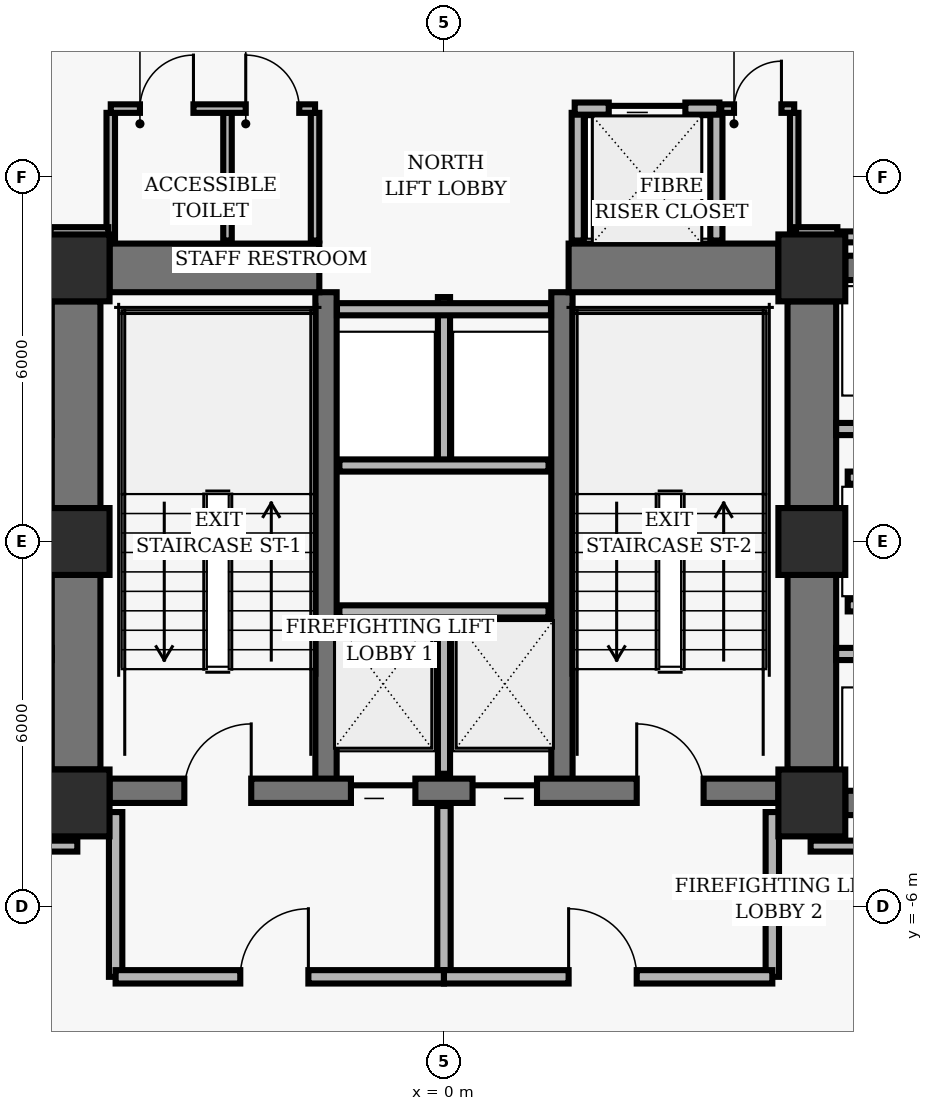
"""IFC4 building model, lengths in metres.
Left out: names, types, materials, properties, quantities, classifications, styles, units other than length and angle.
Written with IfcOpenShell. Run it as: python <this file> out.ifc"""

import sys

from ifc_helpers import new_model, si_unit, direction, frame, frame_2d, origin, origin_2d, place, context, subcontext, project, spatial, rectangle, hollow_rectangle, extrude, element, fill, save


model = new_model("IFC4")
c1 = context("Model", 3, precision=1e-05, world=origin(), true_north=direction((0.0, 1.0)))
c2 = subcontext(c1, "Body", "Model", "MODEL_VIEW")
j1 = project(units=[si_unit("LENGTHUNIT", "METRE"), si_unit("PLANEANGLEUNIT", "RADIAN")], contexts=[c1])
p1 = place(None, origin())
s1 = spatial("IfcSite", under=j1, at=p1, CompositionType="ELEMENT")
p2 = place(p1, origin())
s2 = spatial("IfcBuilding", under=s1, at=p2, CompositionType="ELEMENT")
p3 = place(p2, frame((0.0, 0.0, 15.36)))
s3 = spatial("IfcBuildingStorey", under=s2, at=p3, CompositionType="ELEMENT", Elevation=15.36)
for number, where, z_axis, x_axis in (
    (1, (-6.05, 4.5, 0.0), (0.0, 0.0, 1.0), (1.0, 0.0, 0.0)),
    (2, (6.05, 4.5, 0.0), (0.0, 0.0, 1.0), (1.0, 0.0, 0.0)),
    (3, (-6.05, 0.0, 0.0), (0.0, 0.0, 1.0), (1.0, 0.0, 0.0)),
    (4, (6.05, 0.0, 0.0), (0.0, 0.0, 1.0), (1.0, 0.0, 0.0)),
    (5, (-6.05, -4.3, 0.0), (0.0, 0.0, 1.0), (1.0, 0.0, 0.0)),
    (6, (6.05, -4.3, 0.0), (0.0, 0.0, 1.0), (1.0, 0.0, 0.0)),
):
    element("IfcColumn", number, at=place(p3, frame(where, z_axis=z_axis, x_axis=x_axis)), inside=s3, PredefinedType="COLUMN", context=c2, shape_type="SweptSolid", body=[
        extrude(hollow_rectangle(XDim=1.1, YDim=1.1, WallThickness=0.07, InnerFilletRadius=0.02, OuterFilletRadius=0.04, at=origin_2d()), origin(), (0.0, 0.0, 1.0), 3.52),
    ])
p4 = place(p3, frame((-6.05, 0.55, 0.0), z_axis=(0.0, 0.0, 1.0), x_axis=(0.0, 1.0, 0.0)))
e7 = element("IfcWall", 7, at=p4, inside=s3, PredefinedType="SHEAR", context=c2, shape_type="SweptSolid", body=[
    extrude(rectangle(XDim=3.4, YDim=0.8, at=frame_2d((1.7, 0.0))), origin(), (0.0, 0.0, 1.0), 3.098),
])
p5 = place(p3, frame((-6.05, -3.75, 0.0), z_axis=(0.0, 0.0, 1.0), x_axis=(0.0, 1.0, 0.0)))
e8 = element("IfcWall", 8, at=p5, inside=s3, PredefinedType="SHEAR", context=c2, shape_type="SweptSolid", body=[
    extrude(rectangle(XDim=3.2, YDim=0.8, at=frame_2d((1.6, 0.0))), origin(), (0.0, 0.0, 1.0), 3.098),
])
p6 = place(p3, frame((6.05, 0.55, 0.0), z_axis=(0.0, 0.0, 1.0), x_axis=(0.0, 1.0, 0.0)))
e9 = element("IfcWall", 9, at=p6, inside=s3, PredefinedType="SHEAR", context=c2, shape_type="SweptSolid", body=[
    extrude(rectangle(XDim=3.4, YDim=0.8, at=frame_2d((1.7, 0.0))), origin(), (0.0, 0.0, 1.0), 3.098),
])
p7 = place(p3, frame((6.05, -3.75, 0.0), z_axis=(0.0, 0.0, 1.0), x_axis=(0.0, 1.0, 0.0)))
e10 = element("IfcWall", 10, at=p7, inside=s3, PredefinedType="SHEAR", context=c2, shape_type="SweptSolid", body=[
    extrude(rectangle(XDim=3.2, YDim=0.8, at=frame_2d((1.6, 0.0))), origin(), (0.0, 0.0, 1.0), 3.098),
])
for number, where, z_axis, x_axis in (
    (11, (-1.94, -4.1, 0.0), (0.0, 0.0, 1.0), (0.0, 1.0, 0.0)),
    (12, (1.94, -4.1, 0.0), (0.0, 0.0, 1.0), (0.0, 1.0, 0.0)),
):
    element("IfcWall", number, at=place(p3, frame(where, z_axis=z_axis, x_axis=x_axis)), inside=s3, PredefinedType="SHEAR", context=c2, shape_type="SweptSolid", body=[
        extrude(rectangle(XDim=8.2, YDim=0.35, at=frame_2d((4.1, 0.0))), origin(), (0.0, 0.0, 1.0), 3.098),
    ])
p8 = place(p3, frame((-5.5, -4.1, 0.0), z_axis=(0.0, 0.0, 1.0), x_axis=(1.0, 0.0, 0.0)))
e13 = element("IfcWall", 13, at=p8, inside=s3, PredefinedType="SHEAR", context=c2, shape_type="SweptSolid", body=[
    extrude(rectangle(XDim=11.0, YDim=0.4, at=frame_2d((5.5, 0.0))), origin(), (0.0, 0.0, 1.0), 3.098),
])
p9 = place(p8, frame((1.23, 0.0, 0.0)))
e14 = element("IfcOpeningElement", 14, at=p9, cuts=e13, PredefinedType="OPENING", context=c2, shape_type="SweptSolid", body=[
    extrude(rectangle(XDim=1.1, YDim=2.04, at=frame_2d((0.55, 1.02))), frame((0.0, 0.21, 0.0), z_axis=(0.0, -1.0, 0.0), x_axis=(1.0, 0.0, 0.0)), (0.0, 0.0, 1.0), 0.42),
])
p10 = place(p8, frame((8.67, 0.0, 0.0)))
e15 = element("IfcOpeningElement", 15, at=p10, cuts=e13, PredefinedType="OPENING", context=c2, shape_type="SweptSolid", body=[
    extrude(rectangle(XDim=1.1, YDim=2.04, at=frame_2d((0.55, 1.02))), frame((0.0, 0.21, 0.0), z_axis=(0.0, -1.0, 0.0), x_axis=(1.0, 0.0, 0.0)), (0.0, 0.0, 1.0), 0.42),
])
p11 = place(p8, frame((3.97, 0.0, 0.0)))
e16 = element("IfcOpeningElement", 16, at=p11, cuts=e13, PredefinedType="OPENING", context=c2, shape_type="SweptSolid", body=[
    extrude(rectangle(XDim=1.06, YDim=2.04, at=frame_2d((0.53, 1.02))), frame((0.0, 0.21, 0.0), z_axis=(0.0, -1.0, 0.0), x_axis=(1.0, 0.0, 0.0)), (0.0, 0.0, 1.0), 0.42),
])
p12 = place(p8, frame((5.97, 0.0, 0.0)))
e17 = element("IfcOpeningElement", 17, at=p12, cuts=e13, PredefinedType="OPENING", context=c2, shape_type="SweptSolid", body=[
    extrude(rectangle(XDim=1.06, YDim=2.04, at=frame_2d((0.53, 1.02))), frame((0.0, 0.21, 0.0), z_axis=(0.0, -1.0, 0.0), x_axis=(1.0, 0.0, 0.0)), (0.0, 0.0, 1.0), 0.42),
])
for number, where, z_axis, x_axis in (
    (18, (-5.5, 4.5, 0.0), (0.0, 0.0, 1.0), (1.0, 0.0, 0.0)),
    (19, (2.05, 4.5, 0.0), (0.0, 0.0, 1.0), (1.0, 0.0, 0.0)),
):
    element("IfcWall", number, at=place(p3, frame(where, z_axis=z_axis, x_axis=x_axis)), inside=s3, PredefinedType="SHEAR", context=c2, shape_type="SweptSolid", body=[
        extrude(rectangle(XDim=3.45, YDim=0.8, at=frame_2d((1.725, 0.0))), origin(), (0.0, 0.0, 1.0), 3.098),
    ])
for number, where, z_axis, x_axis in (
    (20, (6.6, 4.5, 0.0), (0.0, 0.0, 1.0), (1.0, 0.0, 0.0)),
    (21, (6.6, -4.3, 0.0), (0.0, 0.0, 1.0), (1.0, 0.0, 0.0)),
):
    element("IfcWall", number, at=place(p3, frame(where, z_axis=z_axis, x_axis=x_axis)), inside=s3, PredefinedType="SHEAR", context=c2, shape_type="SweptSolid", body=[
        extrude(rectangle(XDim=1.8, YDim=0.4, at=frame_2d((0.9, 0.0))), origin(), (0.0, 0.0, 1.0), 3.098),
    ])
p13 = place(p3, frame((0.0, -3.82, 0.0), z_axis=(0.0, 0.0, 1.0), x_axis=(0.0, 1.0, 0.0)))
e22 = element("IfcWall", 22, at=p13, inside=s3, PredefinedType="PARTITIONING", context=c2, shape_type="SweptSolid", body=[
    extrude(rectangle(XDim=2.67, YDim=0.2, at=frame_2d((1.335, 0.0))), origin(), (0.0, 0.0, 1.0), 3.073),
])
p14 = place(p3, frame((-1.72, -1.15, 0.0), z_axis=(0.0, 0.0, 1.0), x_axis=(1.0, 0.0, 0.0)))
e23 = element("IfcWall", 23, at=p14, inside=s3, PredefinedType="PARTITIONING", context=c2, shape_type="SweptSolid", body=[
    extrude(rectangle(XDim=3.44, YDim=0.2, at=frame_2d((1.72, 0.0))), origin(), (0.0, 0.0, 1.0), 3.073),
])
for number, where, z_axis, x_axis in (
    (24, (-5.4, -7.16, 0.0), (0.0, 0.0, 1.0), (0.0, 1.0, 0.0)),
    (25, (5.4, -7.16, 0.0), (0.0, 0.0, 1.0), (0.0, 1.0, 0.0)),
):
    element("IfcWall", number, at=place(p3, frame(where, z_axis=z_axis, x_axis=x_axis)), inside=s3, PredefinedType="PARTITIONING", context=c2, shape_type="SweptSolid", body=[
        extrude(rectangle(XDim=2.71, YDim=0.22, at=frame_2d((1.355, 0.0))), origin(), (0.0, 0.0, 1.0), 3.073),
    ])
p15 = place(p3, frame((0.0, -7.16, 0.0), z_axis=(0.0, 0.0, 1.0), x_axis=(0.0, 1.0, 0.0)))
e26 = element("IfcWall", 26, at=p15, inside=s3, PredefinedType="PARTITIONING", context=c2, shape_type="SweptSolid", body=[
    extrude(rectangle(XDim=2.81, YDim=0.22, at=frame_2d((1.405, 0.0))), origin(), (0.0, 0.0, 1.0), 3.073),
])
p16 = place(p3, frame((-5.4, -7.16, 0.0), z_axis=(0.0, 0.0, 1.0), x_axis=(1.0, 0.0, 0.0)))
e27 = element("IfcWall", 27, at=p16, inside=s3, PredefinedType="PARTITIONING", context=c2, shape_type="SweptSolid", body=[
    extrude(rectangle(XDim=5.4, YDim=0.22, at=frame_2d((2.7, 0.0))), origin(), (0.0, 0.0, 1.0), 3.073),
])
p17 = place(p16, frame((2.05, 0.0, 0.0)))
e28 = element("IfcOpeningElement", 28, at=p17, cuts=e27, PredefinedType="OPENING", context=c2, shape_type="SweptSolid", body=[
    extrude(rectangle(XDim=1.12, YDim=2.02, at=frame_2d((0.56, 1.01))), frame((0.0, 0.12, 0.0), z_axis=(0.0, -1.0, 0.0), x_axis=(1.0, 0.0, 0.0)), (0.0, 0.0, 1.0), 0.24),
])
p18 = place(p3, frame((0.0, -7.16, 0.0), z_axis=(0.0, 0.0, 1.0), x_axis=(1.0, 0.0, 0.0)))
e29 = element("IfcWall", 29, at=p18, inside=s3, PredefinedType="PARTITIONING", context=c2, shape_type="SweptSolid", body=[
    extrude(rectangle(XDim=5.4, YDim=0.22, at=frame_2d((2.7, 0.0))), origin(), (0.0, 0.0, 1.0), 3.073),
])
p19 = place(p18, frame((2.05, 0.0, 0.0)))
e30 = element("IfcOpeningElement", 30, at=p19, cuts=e29, PredefinedType="OPENING", context=c2, shape_type="SweptSolid", body=[
    extrude(rectangle(XDim=1.12, YDim=2.02, at=frame_2d((0.56, 1.01))), frame((0.0, 0.12, 0.0), z_axis=(0.0, -1.0, 0.0), x_axis=(1.0, 0.0, 0.0)), (0.0, 0.0, 1.0), 0.24),
])
p20 = place(p3, frame((0.0, 1.25, 0.0), z_axis=(0.0, 0.0, 1.0), x_axis=(0.0, 1.0, 0.0)))
e31 = element("IfcWall", 31, at=p20, inside=s3, PredefinedType="PARTITIONING", context=c2, shape_type="SweptSolid", body=[
    extrude(rectangle(XDim=2.77, YDim=0.2, at=frame_2d((1.385, 0.0))), origin(), (0.0, 0.0, 1.0), 3.073),
])
p21 = place(p3, frame((-1.72, 1.25, 0.0), z_axis=(0.0, 0.0, 1.0), x_axis=(1.0, 0.0, 0.0)))
e32 = element("IfcWall", 32, at=p21, inside=s3, PredefinedType="PARTITIONING", context=c2, shape_type="SweptSolid", body=[
    extrude(rectangle(XDim=3.44, YDim=0.2, at=frame_2d((1.72, 0.0))), origin(), (0.0, 0.0, 1.0), 3.073),
])
p22 = place(p3, frame((-1.76, 3.82, 0.0), z_axis=(0.0, 0.0, 1.0), x_axis=(1.0, 0.0, 0.0)))
e33 = element("IfcWall", 33, at=p22, inside=s3, PredefinedType="PARTITIONING", context=c2, shape_type="SweptSolid", body=[
    extrude(rectangle(XDim=3.52, YDim=0.2, at=frame_2d((1.76, 0.0))), origin(), (0.0, 0.0, 1.0), 3.073),
])
for number, where, z_axis, x_axis in (
    (34, (2.2, 4.95, 0.0), (0.0, 0.0, 1.0), (0.0, 1.0, 0.0)),
    (35, (4.48, 4.95, 0.0), (0.0, 0.0, 1.0), (0.0, 1.0, 0.0)),
):
    element("IfcWall", number, at=place(p3, frame(where, z_axis=z_axis, x_axis=x_axis)), inside=s3, PredefinedType="PARTITIONING", context=c2, shape_type="SweptSolid", body=[
        extrude(rectangle(XDim=2.1, YDim=0.2, at=frame_2d((1.05, 0.0))), origin(), (0.0, 0.0, 1.0), 3.073),
    ])
p23 = place(p3, frame((2.15, 7.12, 0.0), z_axis=(0.0, 0.0, 1.0), x_axis=(1.0, 0.0, 0.0)))
e36 = element("IfcWall", 36, at=p23, inside=s3, PredefinedType="PARTITIONING", context=c2, shape_type="SweptSolid", body=[
    extrude(rectangle(XDim=2.38, YDim=0.2, at=frame_2d((1.19, 0.0))), origin(), (0.0, 0.0, 1.0), 2.587),
])
p24 = place(p23, frame((0.56, 0.0, 0.0)))
e37 = element("IfcOpeningElement", 37, at=p24, cuts=e36, PredefinedType="OPENING", context=c2, shape_type="SweptSolid", body=[
    extrude(rectangle(XDim=1.26, YDim=2.06, at=frame_2d((0.63, 1.03))), frame((0.0, 0.11, 0.0), z_axis=(0.0, -1.0, 0.0), x_axis=(1.0, 0.0, 0.0)), (0.0, 0.0, 1.0), 0.22),
])
for number, where, z_axis, x_axis in (
    (38, (-5.48, 4.95, 0.0), (0.0, 0.0, 1.0), (0.0, 1.0, 0.0)),
    (39, (-3.56, 4.95, 0.0), (0.0, 0.0, 1.0), (0.0, 1.0, 0.0)),
    (40, (-2.12, 4.95, 0.0), (0.0, 0.0, 1.0), (0.0, 1.0, 0.0)),
):
    element("IfcWall", number, at=place(p3, frame(where, z_axis=z_axis, x_axis=x_axis)), inside=s3, PredefinedType="PARTITIONING", context=c2, shape_type="SweptSolid", body=[
        extrude(rectangle(XDim=2.1, YDim=0.14, at=frame_2d((1.05, 0.0))), origin(), (0.0, 0.0, 1.0), 3.073),
    ])
p25 = place(p3, frame((-5.48, 7.12, 0.0), z_axis=(0.0, 0.0, 1.0), x_axis=(1.0, 0.0, 0.0)))
e41 = element("IfcWall", 41, at=p25, inside=s3, PredefinedType="PARTITIONING", context=c2, shape_type="SweptSolid", body=[
    extrude(rectangle(XDim=3.36, YDim=0.14, at=frame_2d((1.68, 0.0))), origin(), (0.0, 0.0, 1.0), 3.073),
])
p26 = place(p25, frame((0.48, 0.0, 0.0)))
e42 = element("IfcOpeningElement", 42, at=p26, cuts=e41, PredefinedType="OPENING", context=c2, shape_type="SweptSolid", body=[
    extrude(rectangle(XDim=0.88, YDim=2.02, at=frame_2d((0.44, 1.01))), frame((0.0, 0.08, 0.0), z_axis=(0.0, -1.0, 0.0), x_axis=(1.0, 0.0, 0.0)), (0.0, 0.0, 1.0), 0.16),
])
p27 = place(p25, frame((2.22, 0.0, 0.0)))
e43 = element("IfcOpeningElement", 43, at=p27, cuts=e41, PredefinedType="OPENING", context=c2, shape_type="SweptSolid", body=[
    extrude(rectangle(XDim=0.88, YDim=2.02, at=frame_2d((0.44, 1.01))), frame((0.0, 0.08, 0.0), z_axis=(0.0, -1.0, 0.0), x_axis=(1.0, 0.0, 0.0)), (0.0, 0.0, 1.0), 0.16),
])
p28 = place(p3, frame((5.76, 4.95, 0.0), z_axis=(0.0, 0.0, 1.0), x_axis=(0.0, 1.0, 0.0)))
e44 = element("IfcWall", 44, at=p28, inside=s3, PredefinedType="PARTITIONING", context=c2, shape_type="SweptSolid", body=[
    extrude(rectangle(XDim=2.1, YDim=0.14, at=frame_2d((1.05, 0.0))), origin(), (0.0, 0.0, 1.0), 2.198),
])
p29 = place(p3, frame((4.56, 7.12, 0.0), z_axis=(0.0, 0.0, 1.0), x_axis=(1.0, 0.0, 0.0)))
e45 = element("IfcWall", 45, at=p29, inside=s3, PredefinedType="PARTITIONING", context=c2, shape_type="SweptSolid", body=[
    extrude(rectangle(XDim=1.2, YDim=0.14, at=frame_2d((0.6, 0.0))), origin(), (0.0, 0.0, 1.0), 2.587),
])
p30 = place(p29, frame((0.21, 0.0, 0.0)))
e46 = element("IfcOpeningElement", 46, at=p30, cuts=e45, PredefinedType="OPENING", context=c2, shape_type="SweptSolid", body=[
    extrude(rectangle(XDim=0.78, YDim=2.01, at=frame_2d((0.39, 1.005))), frame((0.0, 0.08, 0.0), z_axis=(0.0, -1.0, 0.0), x_axis=(1.0, 0.0, 0.0)), (0.0, 0.0, 1.0), 0.16),
])
for number, where, z_axis, x_axis in (
    (47, (6.45, -1.85, 0.0), (0.0, 0.0, 1.0), (1.0, 0.0, 0.0)),
    (48, (6.45, 1.85, 0.0), (0.0, 0.0, 1.0), (1.0, 0.0, 0.0)),
):
    element("IfcWall", number, at=place(p3, frame(where, z_axis=z_axis, x_axis=x_axis)), inside=s3, PredefinedType="PARTITIONING", context=c2, shape_type="SweptSolid", body=[
        extrude(rectangle(XDim=2.1, YDim=0.2, at=frame_2d((1.05, 0.0))), origin(), (0.0, 0.0, 1.0), 3.073),
    ])
for number, where, z_axis, x_axis in (
    (49, (6.64, -1.05, 0.0), (0.0, 0.0, 1.0), (1.0, 0.0, 0.0)),
    (50, (6.64, 1.05, 0.0), (0.0, 0.0, 1.0), (1.0, 0.0, 0.0)),
):
    element("IfcWall", number, at=place(p3, frame(where, z_axis=z_axis, x_axis=x_axis)), inside=s3, PredefinedType="PARTITIONING", context=c2, shape_type="SweptSolid", body=[
        extrude(rectangle(XDim=1.91, YDim=0.2, at=frame_2d((0.955, 0.0))), origin(), (0.0, 0.0, 1.0), 3.073),
    ])
for number, where, z_axis, x_axis in (
    (51, (-9.37, -5.01, 0.0), (0.0, 0.0, 1.0), (1.0, 0.0, 0.0)),
    (52, (6.03, -5.01, 0.0), (0.0, 0.0, 1.0), (1.0, 0.0, 0.0)),
):
    element("IfcWall", number, at=place(p3, frame(where, z_axis=z_axis, x_axis=x_axis)), inside=s3, PredefinedType="PARTITIONING", context=c2, shape_type="SweptSolid", body=[
        extrude(rectangle(XDim=3.34, YDim=0.18, at=frame_2d((1.67, 0.0))), origin(), (0.0, 0.0, 1.0), 3.073),
    ])
p31 = place(p3, frame((9.37, 5.01, 0.0), z_axis=(0.0, 0.0, 1.0), x_axis=(-1.0, 0.0, 0.0)))
e53 = element("IfcWall", 53, at=p31, inside=s3, PredefinedType="PARTITIONING", context=c2, shape_type="SweptSolid", body=[
    extrude(rectangle(XDim=2.808, YDim=0.18, at=frame_2d((1.404, 0.0))), origin(), (0.0, 0.0, 1.0), 3.073),
])
p32 = place(p3, frame((6.47, 5.08, 0.0), z_axis=(0.0, 0.0, 1.0), x_axis=(-1.0, 0.0, 0.0)))
e54 = element("IfcWall", 54, at=p32, inside=s3, PredefinedType="PARTITIONING", context=c2, shape_type="SweptSolid", body=[
    extrude(rectangle(XDim=0.68, YDim=0.18, at=frame_2d((0.34, 0.0))), origin(), (0.0, 0.0, 1.0), 3.073),
])
p33 = place(p3, frame((-5.52, 5.08, 0.0), z_axis=(0.0, 0.0, 1.0), x_axis=(-1.0, 0.0, 0.0)))
e55 = element("IfcWall", 55, at=p33, inside=s3, PredefinedType="PARTITIONING", context=c2, shape_type="SweptSolid", body=[
    extrude(rectangle(XDim=0.95, YDim=0.18, at=frame_2d((0.475, 0.0))), origin(), (0.0, 0.0, 1.0), 3.073),
])
p34 = place(p9, origin())
e56 = element("IfcDoor", 56, at=p34, inside=s3, OperationType="SINGLE_SWING_RIGHT", PredefinedType="DOOR", context=c2, shape_type="SweptSolid", body=[
    extrude(rectangle(XDim=1.1, YDim=2.04, at=frame_2d((0.55, 1.02))), frame((0.0, 0.025, 0.0), z_axis=(0.0, -1.0, 0.0), x_axis=(1.0, 0.0, 0.0)), (0.0, 0.0, 1.0), 0.05),
])
fill(e14, e56)
p35 = place(p10, origin())
e57 = element("IfcDoor", 57, at=p35, inside=s3, OperationType="SINGLE_SWING_LEFT", PredefinedType="DOOR", context=c2, shape_type="SweptSolid", body=[
    extrude(rectangle(XDim=1.1, YDim=2.04, at=frame_2d((0.55, 1.02))), frame((0.0, 0.025, 0.0), z_axis=(0.0, -1.0, 0.0), x_axis=(1.0, 0.0, 0.0)), (0.0, 0.0, 1.0), 0.05),
])
fill(e15, e57)
p36 = place(p11, origin())
e58 = element("IfcDoor", 58, at=p36, inside=s3, OperationType="SLIDING_TO_LEFT", PredefinedType="DOOR", context=c2, shape_type="SweptSolid", body=[
    extrude(rectangle(XDim=1.06, YDim=2.04, at=frame_2d((0.53, 1.02))), frame((0.0, 0.025, 0.0), z_axis=(0.0, -1.0, 0.0), x_axis=(1.0, 0.0, 0.0)), (0.0, 0.0, 1.0), 0.05),
])
fill(e16, e58)
p37 = place(p12, origin())
e59 = element("IfcDoor", 59, at=p37, inside=s3, OperationType="SLIDING_TO_RIGHT", PredefinedType="DOOR", context=c2, shape_type="SweptSolid", body=[
    extrude(rectangle(XDim=1.06, YDim=2.04, at=frame_2d((0.53, 1.02))), frame((0.0, 0.025, 0.0), z_axis=(0.0, -1.0, 0.0), x_axis=(1.0, 0.0, 0.0)), (0.0, 0.0, 1.0), 0.05),
])
fill(e17, e59)
p38 = place(p17, origin())
e60 = element("IfcDoor", 60, at=p38, inside=s3, OperationType="SINGLE_SWING_RIGHT", PredefinedType="DOOR", context=c2, shape_type="SweptSolid", body=[
    extrude(rectangle(XDim=1.12, YDim=2.02, at=frame_2d((0.56, 1.01))), frame((0.0, 0.025, 0.0), z_axis=(0.0, -1.0, 0.0), x_axis=(1.0, 0.0, 0.0)), (0.0, 0.0, 1.0), 0.05),
])
fill(e28, e60)
p39 = place(p19, origin())
e61 = element("IfcDoor", 61, at=p39, inside=s3, OperationType="SINGLE_SWING_LEFT", PredefinedType="DOOR", context=c2, shape_type="SweptSolid", body=[
    extrude(rectangle(XDim=1.12, YDim=2.02, at=frame_2d((0.56, 1.01))), frame((0.0, 0.025, 0.0), z_axis=(0.0, -1.0, 0.0), x_axis=(1.0, 0.0, 0.0)), (0.0, 0.0, 1.0), 0.05),
])
fill(e30, e61)
p40 = place(p24, origin())
e62 = element("IfcDoor", 62, at=p40, inside=s3, OperationType="SLIDING_TO_LEFT", PredefinedType="DOOR", context=c2, shape_type="SweptSolid", body=[
    extrude(rectangle(XDim=1.26, YDim=2.06, at=frame_2d((0.63, 1.03))), frame((0.0, 0.025, 0.0), z_axis=(0.0, -1.0, 0.0), x_axis=(1.0, 0.0, 0.0)), (0.0, 0.0, 1.0), 0.05),
])
fill(e37, e62)
p41 = place(p26, origin())
e63 = element("IfcDoor", 63, at=p41, inside=s3, OperationType="SINGLE_SWING_RIGHT", PredefinedType="DOOR", context=c2, shape_type="SweptSolid", body=[
    extrude(rectangle(XDim=0.88, YDim=2.02, at=frame_2d((0.44, 1.01))), frame((0.0, 0.025, 0.0), z_axis=(0.0, -1.0, 0.0), x_axis=(1.0, 0.0, 0.0)), (0.0, 0.0, 1.0), 0.05),
])
fill(e42, e63)
p42 = place(p27, origin())
e64 = element("IfcDoor", 64, at=p42, inside=s3, OperationType="SINGLE_SWING_LEFT", PredefinedType="DOOR", context=c2, shape_type="SweptSolid", body=[
    extrude(rectangle(XDim=0.88, YDim=2.02, at=frame_2d((0.44, 1.01))), frame((0.0, 0.025, 0.0), z_axis=(0.0, -1.0, 0.0), x_axis=(1.0, 0.0, 0.0)), (0.0, 0.0, 1.0), 0.05),
])
fill(e43, e64)
p43 = place(p30, origin())
e65 = element("IfcDoor", 65, at=p43, inside=s3, OperationType="SINGLE_SWING_RIGHT", PredefinedType="DOOR", context=c2, shape_type="SweptSolid", body=[
    extrude(rectangle(XDim=0.78, YDim=2.01, at=frame_2d((0.39, 1.005))), frame((0.0, 0.025, 0.0), z_axis=(0.0, -1.0, 0.0), x_axis=(1.0, 0.0, 0.0)), (0.0, 0.0, 1.0), 0.05),
])
fill(e46, e65)
save(model, sys.argv[1])
